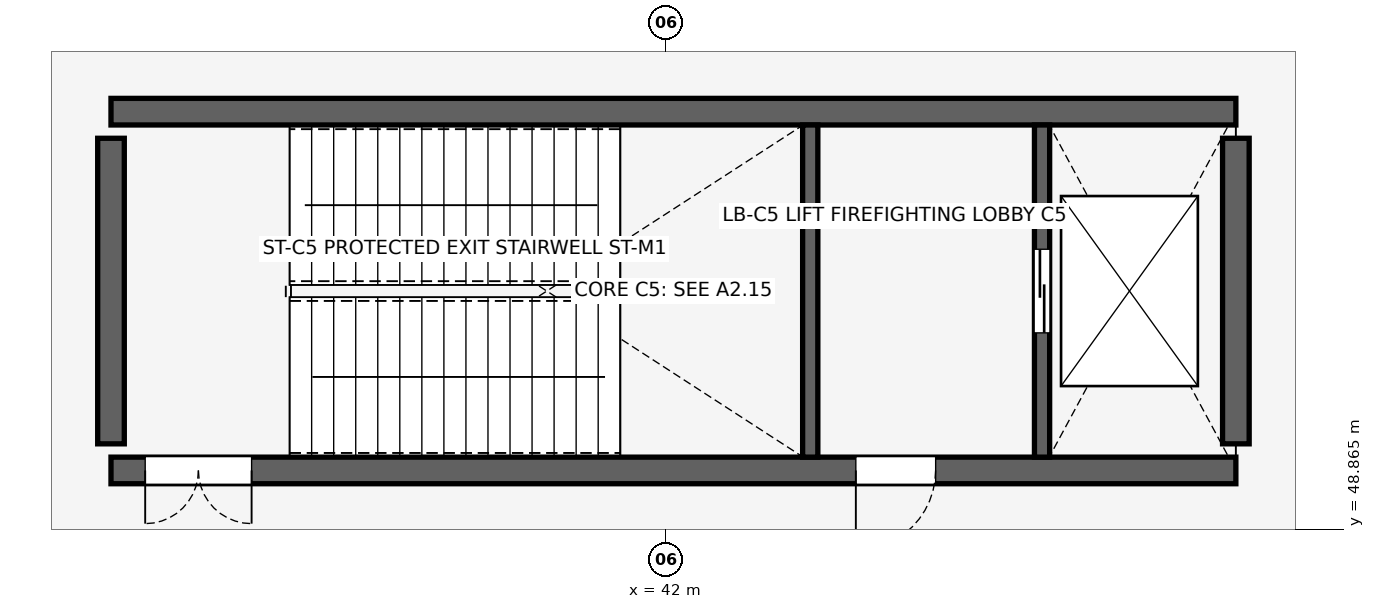
"""IFC4 building model, lengths in metres.
Left out: names, types, materials, properties, quantities, classifications, styles, units other than length and angle.
Written with IfcOpenShell. Run it as: python <this file> out.ifc"""

import sys

from ifc_helpers import new_model, si_unit, direction, frame, frame_2d, origin, place, context, subcontext, project, spatial, rectangle, extrude, element, fill, save


model = new_model("IFC4")
c1 = context("Model", 3, precision=1e-05, world=origin(), true_north=direction((0.0, 1.0)))
c2 = subcontext(c1, "Body", "Model", "MODEL_VIEW")
j1 = project(units=[si_unit("LENGTHUNIT", "METRE"), si_unit("PLANEANGLEUNIT", "RADIAN")], contexts=[c1])
p1 = place(None, origin())
s1 = spatial("IfcSite", under=j1, at=p1, CompositionType="ELEMENT")
p2 = place(p1, origin())
s2 = spatial("IfcBuilding", under=s1, at=p2, CompositionType="ELEMENT")
p3 = place(p2, frame((0.0, 0.0, -5.44)))
s3 = spatial("IfcBuildingStorey", under=s2, at=p3, CompositionType="ELEMENT", Elevation=-5.44)
p4 = place(p3, frame((34.7, 49.64, 0.0), z_axis=(0.0, 0.0, 1.0), x_axis=(1.0, 0.0, 0.0)))
e1 = element("IfcWall", 1, at=p4, inside=s3, PredefinedType="SHEAR", context=c2, shape_type="SweptSolid", body=[
    extrude(rectangle(XDim=14.8, YDim=0.35, at=frame_2d((7.4, 0.0))), origin(), (0.0, 0.0, 1.0), 5.02),
])
p5 = place(p4, frame((1.85, 0.0, 0.0), z_axis=(0.0, 0.0, 1.0), x_axis=(-1.0, 0.0, 0.0)))
e2 = element("IfcOpeningElement", 2, at=p5, cuts=e1, PredefinedType="OPENING", context=c2, shape_type="SweptSolid", body=[
    extrude(rectangle(XDim=1.4, YDim=2.15, at=frame_2d((0.7, 1.075))), frame((0.0, 0.185, 0.0), z_axis=(0.0, -1.0, 0.0), x_axis=(1.0, 0.0, 0.0)), (0.0, 0.0, 1.0), 0.37),
])
p6 = place(p4, frame((10.85, 0.0, 0.0), z_axis=(0.0, 0.0, 1.0), x_axis=(-1.0, 0.0, 0.0)))
e3 = element("IfcOpeningElement", 3, at=p6, cuts=e1, PredefinedType="OPENING", context=c2, shape_type="SweptSolid", body=[
    extrude(rectangle(XDim=1.05, YDim=2.15, at=frame_2d((0.525, 1.075))), frame((0.0, 0.185, 0.0), z_axis=(0.0, -1.0, 0.0), x_axis=(1.0, 0.0, 0.0)), (0.0, 0.0, 1.0), 0.37),
])
p7 = place(p3, frame((34.7, 54.36, 0.0), z_axis=(0.0, 0.0, 1.0), x_axis=(1.0, 0.0, 0.0)))
e4 = element("IfcWall", 4, at=p7, inside=s3, PredefinedType="SHEAR", context=c2, shape_type="SweptSolid", body=[
    extrude(rectangle(XDim=14.8, YDim=0.35, at=frame_2d((7.4, 0.0))), origin(), (0.0, 0.0, 1.0), 5.02),
])
for number, where, z_axis, x_axis in (
    (5, (34.7, 49.99, 0.0), (0.0, 0.0, 1.0), (0.0, 1.0, 0.0)),
    (6, (49.5, 49.99, 0.0), (0.0, 0.0, 1.0), (0.0, 1.0, 0.0)),
):
    element("IfcWall", number, at=place(p3, frame(where, z_axis=z_axis, x_axis=x_axis)), inside=s3, PredefinedType="SHEAR", context=c2, shape_type="SweptSolid", body=[
        extrude(rectangle(XDim=4.02, YDim=0.35, at=frame_2d((2.01, 0.0))), origin(), (0.0, 0.0, 1.0), 5.02),
    ])
p8 = place(p3, frame((43.9, 49.815, 0.0), z_axis=(0.0, 0.0, 1.0), x_axis=(0.0, 1.0, 0.0)))
e7 = element("IfcWall", 7, at=p8, inside=s3, PredefinedType="SHEAR", context=c2, shape_type="SweptSolid", body=[
    extrude(rectangle(XDim=4.37, YDim=0.2, at=frame_2d((2.185, 0.0))), origin(), (0.0, 0.0, 1.0), 5.02),
])
p9 = place(p3, frame((46.95, 49.815, 0.0), z_axis=(0.0, 0.0, 1.0), x_axis=(0.0, 1.0, 0.0)))
e8 = element("IfcWall", 8, at=p9, inside=s3, PredefinedType="SHEAR", context=c2, shape_type="SweptSolid", body=[
    extrude(rectangle(XDim=4.37, YDim=0.2, at=frame_2d((2.185, 0.0))), origin(), (0.0, 0.0, 1.0), 5.02),
])
p10 = place(p9, frame((1.635, 0.0, 0.0), z_axis=(0.0, 0.0, 1.0), x_axis=(1.0, 0.0, 0.0)))
e9 = element("IfcOpeningElement", 9, at=p10, cuts=e8, PredefinedType="OPENING", context=c2, shape_type="SweptSolid", body=[
    extrude(rectangle(XDim=1.1, YDim=2.15, at=frame_2d((0.55, 1.075))), frame((0.0, 0.11, 0.0), z_axis=(0.0, -1.0, 0.0), x_axis=(1.0, 0.0, 0.0)), (0.0, 0.0, 1.0), 0.22),
])
p11 = place(p5, origin())
e10 = element("IfcDoor", 10, at=p11, inside=s3, OperationType="DOUBLE_DOOR_SINGLE_SWING", PredefinedType="DOOR", context=c2, shape_type="SweptSolid", body=[
    extrude(rectangle(XDim=1.4, YDim=2.15, at=frame_2d((0.7, 1.075))), frame((0.0, 0.025, 0.0), z_axis=(0.0, -1.0, 0.0), x_axis=(1.0, 0.0, 0.0)), (0.0, 0.0, 1.0), 0.05),
])
fill(e2, e10)
p12 = place(p6, origin())
e11 = element("IfcDoor", 11, at=p12, inside=s3, OperationType="SINGLE_SWING_RIGHT", PredefinedType="DOOR", context=c2, shape_type="SweptSolid", body=[
    extrude(rectangle(XDim=1.05, YDim=2.15, at=frame_2d((0.525, 1.075))), frame((0.0, 0.025, 0.0), z_axis=(0.0, -1.0, 0.0), x_axis=(1.0, 0.0, 0.0)), (0.0, 0.0, 1.0), 0.05),
])
fill(e3, e11)
p13 = place(p10, origin())
e12 = element("IfcDoor", 12, at=p13, inside=s3, OperationType="DOUBLE_DOOR_SLIDING", PredefinedType="DOOR", context=c2, shape_type="SweptSolid", body=[
    extrude(rectangle(XDim=1.1, YDim=2.15, at=frame_2d((0.55, 1.075))), frame((0.0, 0.025, 0.0), z_axis=(0.0, -1.0, 0.0), x_axis=(1.0, 0.0, 0.0)), (0.0, 0.0, 1.0), 0.05),
])
fill(e9, e12)
save(model, sys.argv[1])
